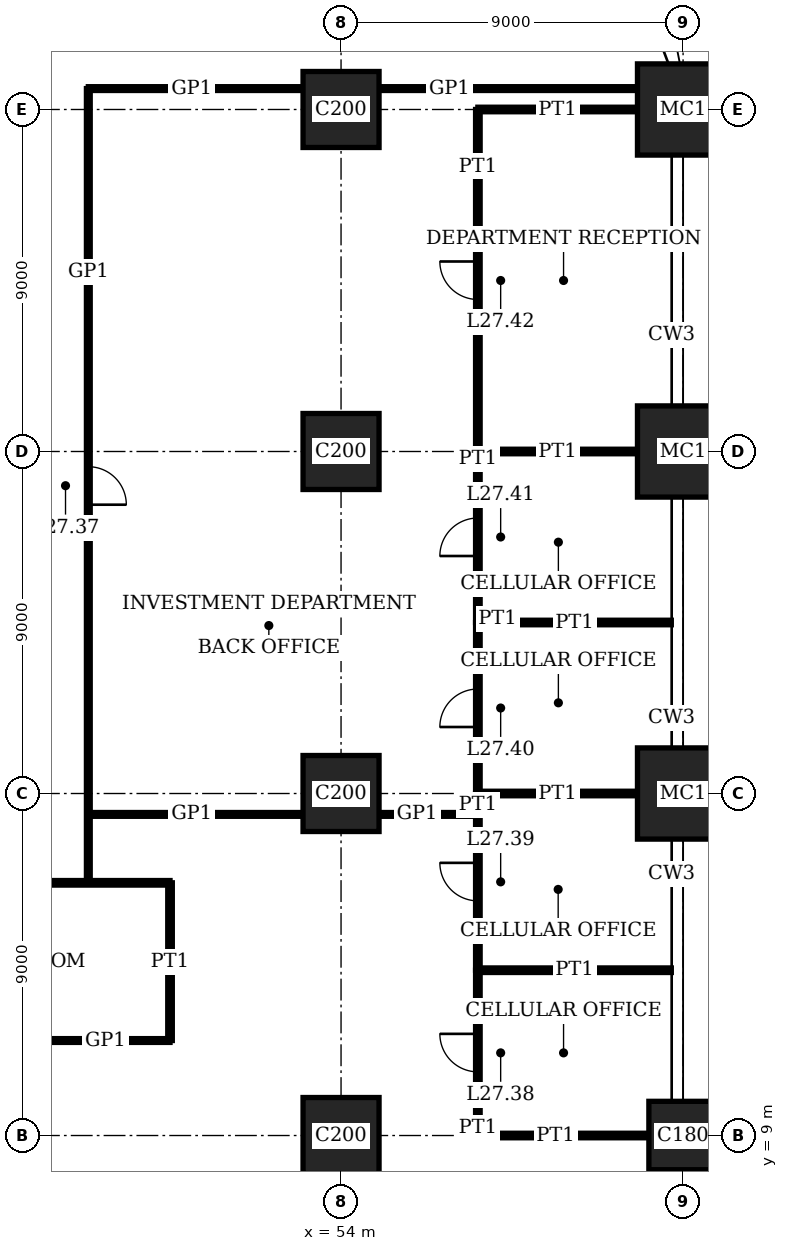
"""IFC4 building model, lengths in metres.
Left out: names, types, materials, properties, quantities, classifications, styles, units other than length and angle.
Written with IfcOpenShell. Run it as: python <this file> out.ifc"""

import sys

from ifc_helpers import new_model, si_unit, direction, frame, frame_2d, origin, origin_2d, place, context, subcontext, project, spatial, rectangle, extrude, element, fill, save


model = new_model("IFC4")
c1 = context("Model", 3, precision=1e-05, world=origin(), true_north=direction((0.0, 1.0)))
c2 = subcontext(c1, "Body", "Model", "MODEL_VIEW")
j1 = project(units=[si_unit("LENGTHUNIT", "METRE"), si_unit("PLANEANGLEUNIT", "RADIAN")], contexts=[c1])
p1 = place(None, origin())
s1 = spatial("IfcSite", under=j1, at=p1, CompositionType="ELEMENT")
p2 = place(p1, origin())
s2 = spatial("IfcBuilding", under=s1, at=p2, CompositionType="ELEMENT")
p3 = place(p2, frame((0.0, 0.0, 113.0)))
s3 = spatial("IfcBuildingStorey", under=s2, at=p3, CompositionType="ELEMENT", Elevation=113.0)
for number, where, z_axis, x_axis in (
    (1, (54.0, 9.0, 0.0), (0.0, 0.0, 1.0), (1.0, 0.0, 0.0)),
    (2, (54.0, 18.0, 0.0), (0.0, 0.0, 1.0), (1.0, 0.0, 0.0)),
    (3, (54.0, 27.0, 0.0), (0.0, 0.0, 1.0), (1.0, 0.0, 0.0)),
    (4, (54.0, 36.0, 0.0), (0.0, 0.0, 1.0), (1.0, 0.0, 0.0)),
):
    element("IfcColumn", number, at=place(p3, frame(where, z_axis=z_axis, x_axis=x_axis)), inside=s3, PredefinedType="COLUMN", context=c2, shape_type="SweptSolid", body=[
        extrude(rectangle(XDim=2.0, YDim=2.0, at=origin_2d()), origin(), (0.0, 0.0, 1.0), 4.0),
    ])
p4 = place(p3, frame((63.0, 9.0, 0.0), z_axis=(0.0, 0.0, 1.0), x_axis=(1.0, 0.0, 0.0)))
e5 = element("IfcColumn", 5, at=p4, inside=s3, PredefinedType="COLUMN", context=c2, shape_type="SweptSolid", body=[
    extrude(rectangle(XDim=1.8, YDim=1.8, at=origin_2d()), origin(), (0.0, 0.0, 1.0), 4.0),
])
for number, where, z_axis, x_axis in (
    (6, (63.0, 18.0, 0.0), (0.0, 0.0, 1.0), (1.0, 0.0, 0.0)),
    (7, (63.0, 27.0, 0.0), (0.0, 0.0, 1.0), (1.0, 0.0, 0.0)),
    (8, (63.0, 36.0, 0.0), (0.0, 0.0, 1.0), (1.0, 0.0, 0.0)),
):
    element("IfcColumn", number, at=place(p3, frame(where, z_axis=z_axis, x_axis=x_axis)), inside=s3, PredefinedType="COLUMN", context=c2, shape_type="SweptSolid", body=[
        extrude(rectangle(XDim=2.4, YDim=2.4, at=origin_2d()), origin(), (0.0, 0.0, 1.0), 4.0),
    ])
p5 = place(p3, frame((57.6, 9.0, 0.0), z_axis=(0.0, 0.0, 1.0), x_axis=(1.0, 0.0, 0.0)))
e9 = element("IfcWall", 9, at=p5, inside=s3, PredefinedType="PARTITIONING", context=c2, shape_type="SweptSolid", body=[
    extrude(rectangle(XDim=4.5, YDim=0.12, at=frame_2d((2.25, 0.0))), origin(), (0.0, 0.0, 1.0), 3.05),
])
p6 = place(p3, frame((40.5, 11.5, 0.0), z_axis=(0.0, 0.0, 1.0), x_axis=(1.0, 0.0, 0.0)))
e10 = element("IfcWall", 10, at=p6, inside=s3, PredefinedType="PARTITIONING", context=c2, shape_type="SweptSolid", body=[
    extrude(rectangle(XDim=9.0, YDim=0.1, at=frame_2d((4.5, 0.0))), origin(), (0.0, 0.0, 1.0), 3.75),
])
p7 = place(p6, frame((4.0, 0.0, 0.0)))
e11 = element("IfcOpeningElement", 11, at=p7, cuts=e10, PredefinedType="OPENING", context=c2, shape_type="SweptSolid", body=[
    extrude(rectangle(XDim=1.0, YDim=2.4, at=frame_2d((0.5, 1.2))), frame((0.0, 0.06, 0.0), z_axis=(0.0, -1.0, 0.0), x_axis=(1.0, 0.0, 0.0)), (0.0, 0.0, 1.0), 0.12),
])
p8 = place(p3, frame((57.6, 13.35, 0.0), z_axis=(0.0, 0.0, 1.0), x_axis=(1.0, 0.0, 0.0)))
e12 = element("IfcWall", 12, at=p8, inside=s3, PredefinedType="PARTITIONING", context=c2, shape_type="SweptSolid", body=[
    extrude(rectangle(XDim=5.09, YDim=0.12, at=frame_2d((2.545, 0.0))), origin(), (0.0, 0.0, 1.0), 3.1),
])
p9 = place(p3, frame((40.5, 15.65, 0.0), z_axis=(0.0, 0.0, 1.0), x_axis=(1.0, 0.0, 0.0)))
e13 = element("IfcWall", 13, at=p9, inside=s3, PredefinedType="PARTITIONING", context=c2, shape_type="SweptSolid", body=[
    extrude(rectangle(XDim=9.0, YDim=0.12, at=frame_2d((4.5, 0.0))), origin(), (0.0, 0.0, 1.0), 3.75),
])
p10 = place(p3, frame((47.35, 17.45, 0.0), z_axis=(0.0, 0.0, 1.0), x_axis=(1.0, 0.0, 0.0)))
e14 = element("IfcWall", 14, at=p10, inside=s3, PredefinedType="PARTITIONING", context=c2, shape_type="SweptSolid", body=[
    extrude(rectangle(XDim=5.65, YDim=0.1, at=frame_2d((2.825, 0.0))), origin(), (0.0, 0.0, 1.0), 3.75),
])
p11 = place(p3, frame((55.0, 17.45, 0.0), z_axis=(0.0, 0.0, 1.0), x_axis=(1.0, 0.0, 0.0)))
e15 = element("IfcWall", 15, at=p11, inside=s3, PredefinedType="PARTITIONING", context=c2, shape_type="SweptSolid", body=[
    extrude(rectangle(XDim=2.61, YDim=0.1, at=frame_2d((1.305, 0.0))), origin(), (0.0, 0.0, 1.0), 3.75),
])
p12 = place(p3, frame((57.6, 18.0, 0.0), z_axis=(0.0, 0.0, 1.0), x_axis=(1.0, 0.0, 0.0)))
e16 = element("IfcWall", 16, at=p12, inside=s3, PredefinedType="PARTITIONING", context=c2, shape_type="SweptSolid", body=[
    extrude(rectangle(XDim=4.2, YDim=0.12, at=frame_2d((2.1, 0.0))), origin(), (0.0, 0.0, 1.0), 3.05),
])
p13 = place(p3, frame((57.6, 22.5, 0.0), z_axis=(0.0, 0.0, 1.0), x_axis=(1.0, 0.0, 0.0)))
e17 = element("IfcWall", 17, at=p13, inside=s3, PredefinedType="PARTITIONING", context=c2, shape_type="SweptSolid", body=[
    extrude(rectangle(XDim=5.09, YDim=0.12, at=frame_2d((2.545, 0.0))), origin(), (0.0, 0.0, 1.0), 3.1),
])
for number, where, z_axis, x_axis in (
    (18, (57.6, 27.0, 0.0), (0.0, 0.0, 1.0), (1.0, 0.0, 0.0)),
    (19, (57.6, 36.0, 0.0), (0.0, 0.0, 1.0), (1.0, 0.0, 0.0)),
):
    element("IfcWall", number, at=place(p3, frame(where, z_axis=z_axis, x_axis=x_axis)), inside=s3, PredefinedType="PARTITIONING", context=c2, shape_type="SweptSolid", body=[
        extrude(rectangle(XDim=4.2, YDim=0.12, at=frame_2d((2.1, 0.0))), origin(), (0.0, 0.0, 1.0), 3.05),
    ])
p14 = place(p3, frame((47.35, 36.55, 0.0), z_axis=(0.0, 0.0, 1.0), x_axis=(1.0, 0.0, 0.0)))
e20 = element("IfcWall", 20, at=p14, inside=s3, PredefinedType="PARTITIONING", context=c2, shape_type="SweptSolid", body=[
    extrude(rectangle(XDim=5.65, YDim=0.1, at=frame_2d((2.825, 0.0))), origin(), (0.0, 0.0, 1.0), 3.75),
])
p15 = place(p3, frame((55.0, 36.55, 0.0), z_axis=(0.0, 0.0, 1.0), x_axis=(1.0, 0.0, 0.0)))
e21 = element("IfcWall", 21, at=p15, inside=s3, PredefinedType="PARTITIONING", context=c2, shape_type="SweptSolid", body=[
    extrude(rectangle(XDim=6.8, YDim=0.1, at=frame_2d((3.4, 0.0))), origin(), (0.0, 0.0, 1.0), 3.75),
])
p16 = place(p3, frame((47.35, 15.65, 0.0), z_axis=(0.0, 0.0, 1.0), x_axis=(0.0, 1.0, 0.0)))
e22 = element("IfcWall", 22, at=p16, inside=s3, PredefinedType="PARTITIONING", context=c2, shape_type="SweptSolid", body=[
    extrude(rectangle(XDim=20.9, YDim=0.1, at=frame_2d((10.45, 0.0))), origin(), (0.0, 0.0, 1.0), 3.75),
])
p17 = place(p16, frame((9.95, 0.0, 0.0)))
e23 = element("IfcOpeningElement", 23, at=p17, cuts=e22, PredefinedType="OPENING", context=c2, shape_type="SweptSolid", body=[
    extrude(rectangle(XDim=1.0, YDim=2.4, at=frame_2d((0.5, 1.2))), frame((0.0, 0.06, 0.0), z_axis=(0.0, -1.0, 0.0), x_axis=(1.0, 0.0, 0.0)), (0.0, 0.0, 1.0), 0.12),
])
p18 = place(p3, frame((49.5, 11.5, 0.0), z_axis=(0.0, 0.0, 1.0), x_axis=(0.0, 1.0, 0.0)))
e24 = element("IfcWall", 24, at=p18, inside=s3, PredefinedType="PARTITIONING", context=c2, shape_type="SweptSolid", body=[
    extrude(rectangle(XDim=4.15, YDim=0.12, at=frame_2d((2.075, 0.0))), origin(), (0.0, 0.0, 1.0), 3.75),
])
p19 = place(p3, frame((57.6, 9.0, 0.0), z_axis=(0.0, 0.0, 1.0), x_axis=(0.0, 1.0, 0.0)))
e25 = element("IfcWall", 25, at=p19, inside=s3, PredefinedType="PARTITIONING", context=c2, shape_type="SweptSolid", body=[
    extrude(rectangle(XDim=4.35, YDim=0.12, at=frame_2d((2.175, 0.0))), origin(), (0.0, 0.0, 1.0), 3.75),
])
p20 = place(p19, frame((1.675, 0.0, 0.0)))
e26 = element("IfcOpeningElement", 26, at=p20, cuts=e25, PredefinedType="OPENING", context=c2, shape_type="SweptSolid", body=[
    extrude(rectangle(XDim=1.0, YDim=2.4, at=frame_2d((0.5, 1.2))), frame((0.0, 0.07, 0.0), z_axis=(0.0, -1.0, 0.0), x_axis=(1.0, 0.0, 0.0)), (0.0, 0.0, 1.0), 0.14),
])
p21 = place(p3, frame((57.6, 13.35, 0.0), z_axis=(0.0, 0.0, 1.0), x_axis=(0.0, 1.0, 0.0)))
e27 = element("IfcWall", 27, at=p21, inside=s3, PredefinedType="PARTITIONING", context=c2, shape_type="SweptSolid", body=[
    extrude(rectangle(XDim=4.65, YDim=0.12, at=frame_2d((2.325, 0.0))), origin(), (0.0, 0.0, 1.0), 3.75),
])
p22 = place(p21, frame((1.825, 0.0, 0.0)))
e28 = element("IfcOpeningElement", 28, at=p22, cuts=e27, PredefinedType="OPENING", context=c2, shape_type="SweptSolid", body=[
    extrude(rectangle(XDim=1.0, YDim=2.4, at=frame_2d((0.5, 1.2))), frame((0.0, 0.07, 0.0), z_axis=(0.0, -1.0, 0.0), x_axis=(1.0, 0.0, 0.0)), (0.0, 0.0, 1.0), 0.14),
])
p23 = place(p3, frame((57.6, 18.0, 0.0), z_axis=(0.0, 0.0, 1.0), x_axis=(0.0, 1.0, 0.0)))
e29 = element("IfcWall", 29, at=p23, inside=s3, PredefinedType="PARTITIONING", context=c2, shape_type="SweptSolid", body=[
    extrude(rectangle(XDim=4.5, YDim=0.12, at=frame_2d((2.25, 0.0))), origin(), (0.0, 0.0, 1.0), 3.75),
])
p24 = place(p23, frame((1.75, 0.0, 0.0)))
e30 = element("IfcOpeningElement", 30, at=p24, cuts=e29, PredefinedType="OPENING", context=c2, shape_type="SweptSolid", body=[
    extrude(rectangle(XDim=1.0, YDim=2.4, at=frame_2d((0.5, 1.2))), frame((0.0, 0.07, 0.0), z_axis=(0.0, -1.0, 0.0), x_axis=(1.0, 0.0, 0.0)), (0.0, 0.0, 1.0), 0.14),
])
p25 = place(p3, frame((57.6, 22.5, 0.0), z_axis=(0.0, 0.0, 1.0), x_axis=(0.0, 1.0, 0.0)))
e31 = element("IfcWall", 31, at=p25, inside=s3, PredefinedType="PARTITIONING", context=c2, shape_type="SweptSolid", body=[
    extrude(rectangle(XDim=4.5, YDim=0.12, at=frame_2d((2.25, 0.0))), origin(), (0.0, 0.0, 1.0), 3.75),
])
p26 = place(p25, frame((1.75, 0.0, 0.0)))
e32 = element("IfcOpeningElement", 32, at=p26, cuts=e31, PredefinedType="OPENING", context=c2, shape_type="SweptSolid", body=[
    extrude(rectangle(XDim=1.0, YDim=2.4, at=frame_2d((0.5, 1.2))), frame((0.0, 0.07, 0.0), z_axis=(0.0, -1.0, 0.0), x_axis=(1.0, 0.0, 0.0)), (0.0, 0.0, 1.0), 0.14),
])
p27 = place(p3, frame((57.6, 27.0, 0.0), z_axis=(0.0, 0.0, 1.0), x_axis=(0.0, 1.0, 0.0)))
e33 = element("IfcWall", 33, at=p27, inside=s3, PredefinedType="PARTITIONING", context=c2, shape_type="SweptSolid", body=[
    extrude(rectangle(XDim=9.0, YDim=0.12, at=frame_2d((4.5, 0.0))), origin(), (0.0, 0.0, 1.0), 3.75),
])
p28 = place(p27, frame((4.0, 0.0, 0.0)))
e34 = element("IfcOpeningElement", 34, at=p28, cuts=e33, PredefinedType="OPENING", context=c2, shape_type="SweptSolid", body=[
    extrude(rectangle(XDim=1.0, YDim=2.4, at=frame_2d((0.5, 1.2))), frame((0.0, 0.07, 0.0), z_axis=(0.0, -1.0, 0.0), x_axis=(1.0, 0.0, 0.0)), (0.0, 0.0, 1.0), 0.14),
])
p29 = place(p17, origin())
e35 = element("IfcDoor", 35, at=p29, inside=s3, OperationType="SINGLE_SWING_LEFT", PredefinedType="DOOR", context=c2, shape_type="SweptSolid", body=[
    extrude(rectangle(XDim=1.0, YDim=2.4, at=frame_2d((0.5, 1.2))), frame((0.0, 0.02, 0.0), z_axis=(0.0, -1.0, 0.0), x_axis=(1.0, 0.0, 0.0)), (0.0, 0.0, 1.0), 0.04),
])
fill(e23, e35)
p30 = place(p20, origin())
e36 = element("IfcDoor", 36, at=p30, inside=s3, OperationType="SINGLE_SWING_LEFT", PredefinedType="DOOR", context=c2, shape_type="SweptSolid", body=[
    extrude(rectangle(XDim=1.0, YDim=2.4, at=frame_2d((0.5, 1.2))), frame((0.0, 0.025, 0.0), z_axis=(0.0, -1.0, 0.0), x_axis=(1.0, 0.0, 0.0)), (0.0, 0.0, 1.0), 0.05),
])
fill(e26, e36)
p31 = place(p22, origin())
e37 = element("IfcDoor", 37, at=p31, inside=s3, OperationType="SINGLE_SWING_LEFT", PredefinedType="DOOR", context=c2, shape_type="SweptSolid", body=[
    extrude(rectangle(XDim=1.0, YDim=2.4, at=frame_2d((0.5, 1.2))), frame((0.0, 0.025, 0.0), z_axis=(0.0, -1.0, 0.0), x_axis=(1.0, 0.0, 0.0)), (0.0, 0.0, 1.0), 0.05),
])
fill(e28, e37)
p32 = place(p24, origin())
e38 = element("IfcDoor", 38, at=p32, inside=s3, OperationType="SINGLE_SWING_RIGHT", PredefinedType="DOOR", context=c2, shape_type="SweptSolid", body=[
    extrude(rectangle(XDim=1.0, YDim=2.4, at=frame_2d((0.5, 1.2))), frame((0.0, 0.025, 0.0), z_axis=(0.0, -1.0, 0.0), x_axis=(1.0, 0.0, 0.0)), (0.0, 0.0, 1.0), 0.05),
])
fill(e30, e38)
p33 = place(p26, origin())
e39 = element("IfcDoor", 39, at=p33, inside=s3, OperationType="SINGLE_SWING_RIGHT", PredefinedType="DOOR", context=c2, shape_type="SweptSolid", body=[
    extrude(rectangle(XDim=1.0, YDim=2.4, at=frame_2d((0.5, 1.2))), frame((0.0, 0.025, 0.0), z_axis=(0.0, -1.0, 0.0), x_axis=(1.0, 0.0, 0.0)), (0.0, 0.0, 1.0), 0.05),
])
fill(e32, e39)
p34 = place(p28, origin())
e40 = element("IfcDoor", 40, at=p34, inside=s3, OperationType="SINGLE_SWING_LEFT", PredefinedType="DOOR", context=c2, shape_type="SweptSolid", body=[
    extrude(rectangle(XDim=1.0, YDim=2.4, at=frame_2d((0.5, 1.2))), frame((0.0, 0.025, 0.0), z_axis=(0.0, -1.0, 0.0), x_axis=(1.0, 0.0, 0.0)), (0.0, 0.0, 1.0), 0.05),
])
fill(e34, e40)
save(model, sys.argv[1])
